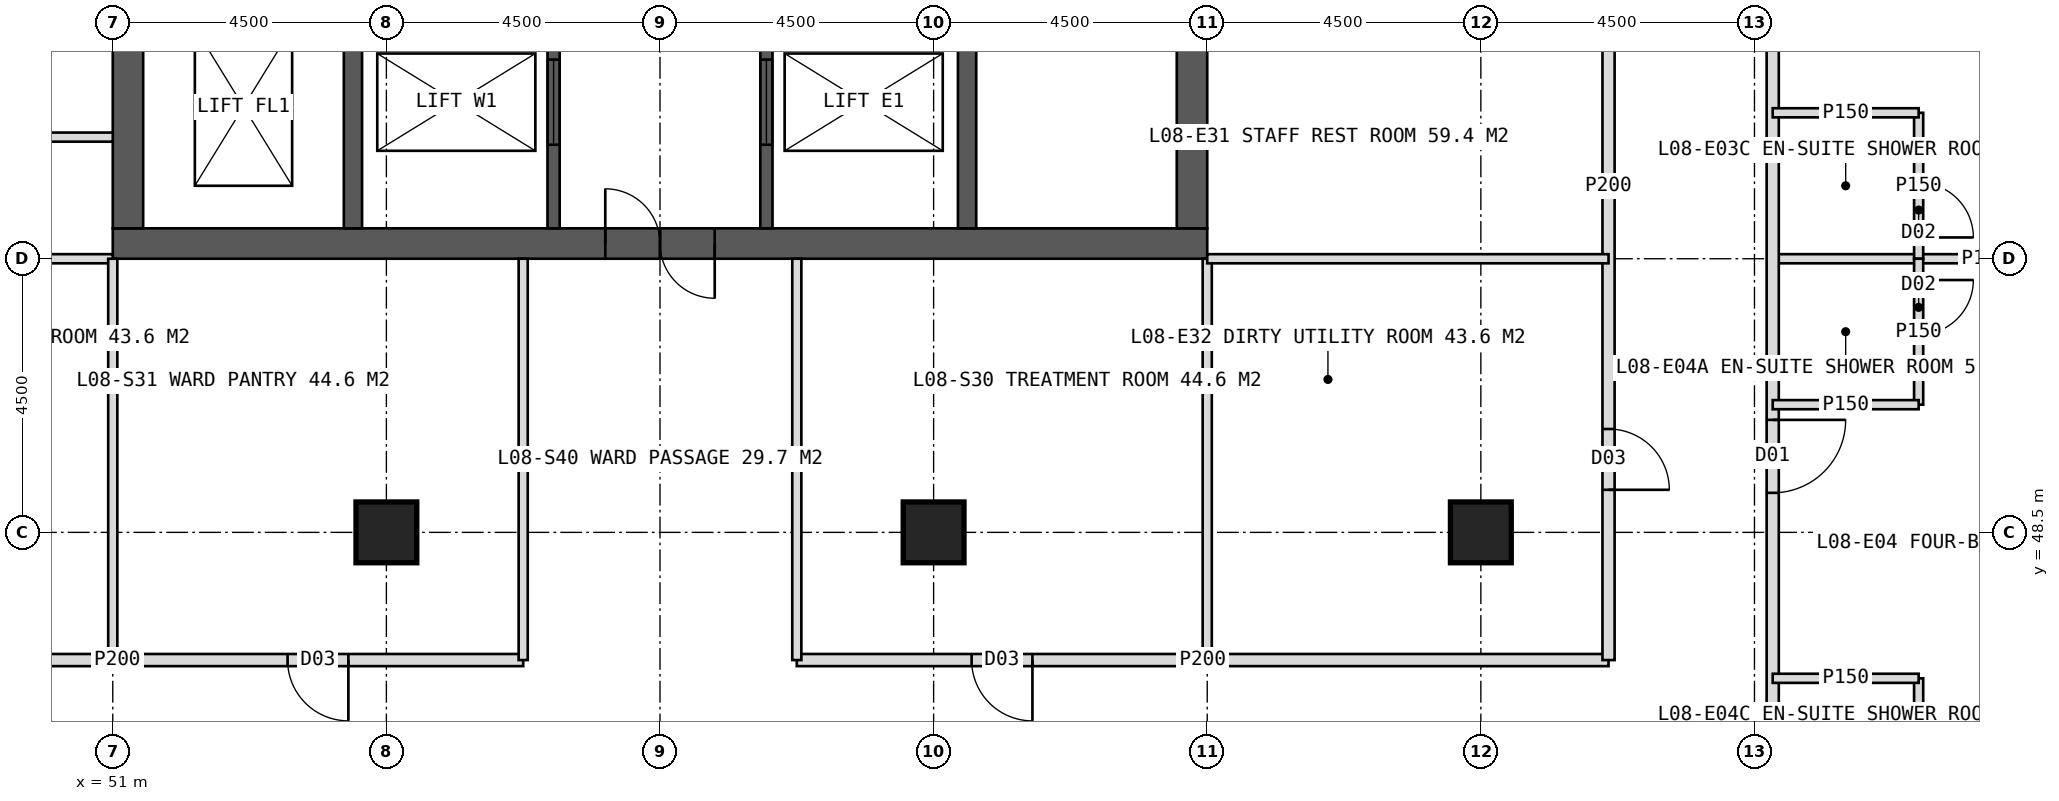
"""IFC4 building model, lengths in metres.
Left out: names, types, materials, properties, quantities, classifications, styles, units other than length and angle.
Written with IfcOpenShell. Run it as: python <this file> out.ifc"""

import sys

from ifc_helpers import new_model, si_unit, direction, frame, frame_2d, origin, origin_2d, place, context, subcontext, project, spatial, rectangle, hollow_rectangle, extrude, element, fill, save


model = new_model("IFC4")
c1 = context("Model", 3, precision=1e-05, world=origin(), true_north=direction((0.0, 1.0)))
c2 = subcontext(c1, "Body", "Model", "MODEL_VIEW")
j1 = project(units=[si_unit("LENGTHUNIT", "METRE"), si_unit("PLANEANGLEUNIT", "RADIAN")], contexts=[c1])
p1 = place(None, origin())
s1 = spatial("IfcSite", under=j1, at=p1, CompositionType="ELEMENT")
p2 = place(p1, origin())
s2 = spatial("IfcBuilding", under=s1, at=p2, CompositionType="ELEMENT")
p3 = place(p2, frame((0.0, 0.0, 39.0)))
s3 = spatial("IfcBuildingStorey", under=s2, at=p3, CompositionType="ELEMENT", Elevation=39.0)
p4 = place(p3, frame((51.0, 53.25, 0.0), z_axis=(0.0, 0.0, 1.0), x_axis=(1.0, 0.0, 0.0)))
e1 = element("IfcWall", 1, at=p4, inside=s3, PredefinedType="SHEAR", context=c2, shape_type="SweptSolid", body=[
    extrude(rectangle(XDim=18.0, YDim=0.5, at=frame_2d((9.0, 0.0))), origin(), (0.0, 0.0, 1.0), 4.0),
])
p5 = place(p4, frame((8.1, 0.0, 0.0)))
e2 = element("IfcOpeningElement", 2, at=p5, cuts=e1, PredefinedType="OPENING", context=c2, shape_type="SweptSolid", body=[
    extrude(rectangle(XDim=1.8, YDim=2.2, at=frame_2d((0.9, 1.1))), frame((0.0, 0.26, 0.0), z_axis=(0.0, -1.0, 0.0), x_axis=(1.0, 0.0, 0.0)), (0.0, 0.0, 1.0), 0.52),
])
p6 = place(p3, frame((51.25, 53.5, 0.0), z_axis=(0.0, 0.0, 1.0), x_axis=(0.0, 1.0, 0.0)))
e3 = element("IfcWall", 3, at=p6, inside=s3, PredefinedType="SHEAR", context=c2, shape_type="SweptSolid", body=[
    extrude(rectangle(XDim=17.0, YDim=0.5, at=frame_2d((8.5, 0.0))), origin(), (0.0, 0.0, 1.0), 4.0),
])
p7 = place(p6, frame((6.0, 0.0, 0.0)))
e4 = element("IfcOpeningElement", 4, at=p7, cuts=e3, PredefinedType="OPENING", context=c2, shape_type="SweptSolid", body=[
    extrude(rectangle(XDim=1.5, YDim=2.2, at=frame_2d((0.75, 1.1))), frame((0.0, 0.26, 0.0), z_axis=(0.0, -1.0, 0.0), x_axis=(1.0, 0.0, 0.0)), (0.0, 0.0, 1.0), 0.52),
])
p8 = place(p3, frame((68.75, 53.5, 0.0), z_axis=(0.0, 0.0, 1.0), x_axis=(0.0, 1.0, 0.0)))
e5 = element("IfcWall", 5, at=p8, inside=s3, PredefinedType="SHEAR", context=c2, shape_type="SweptSolid", body=[
    extrude(rectangle(XDim=17.0, YDim=0.5, at=frame_2d((8.5, 0.0))), origin(), (0.0, 0.0, 1.0), 4.0),
])
p9 = place(p8, frame((9.5, 0.0, 0.0)))
e6 = element("IfcOpeningElement", 6, at=p9, cuts=e5, PredefinedType="OPENING", context=c2, shape_type="SweptSolid", body=[
    extrude(rectangle(XDim=1.5, YDim=2.2, at=frame_2d((0.75, 1.1))), frame((0.0, 0.26, 0.0), z_axis=(0.0, -1.0, 0.0), x_axis=(1.0, 0.0, 0.0)), (0.0, 0.0, 1.0), 0.52),
])
for number, where, z_axis, x_axis in (
    (7, (54.95, 53.5, 0.0), (0.0, 0.0, 1.0), (0.0, 1.0, 0.0)),
    (8, (65.05, 53.5, 0.0), (0.0, 0.0, 1.0), (0.0, 1.0, 0.0)),
):
    element("IfcWall", number, at=place(p3, frame(where, z_axis=z_axis, x_axis=x_axis)), inside=s3, PredefinedType="SHEAR", context=c2, shape_type="SweptSolid", body=[
        extrude(rectangle(XDim=17.0, YDim=0.3, at=frame_2d((8.5, 0.0))), origin(), (0.0, 0.0, 1.0), 4.0),
    ])
p10 = place(p3, frame((58.25, 53.5, 0.0), z_axis=(0.0, 0.0, 1.0), x_axis=(0.0, 1.0, 0.0)))
e9 = element("IfcWall", 9, at=p10, inside=s3, PredefinedType="SHEAR", context=c2, shape_type="SweptSolid", body=[
    extrude(rectangle(XDim=17.0, YDim=0.2, at=frame_2d((8.5, 0.0))), origin(), (0.0, 0.0, 1.0), 4.0),
])
p11 = place(p10, frame((1.375, 0.0, 0.0)))
e10 = element("IfcOpeningElement", 10, at=p11, cuts=e9, PredefinedType="OPENING", context=c2, shape_type="SweptSolid", body=[
    extrude(rectangle(XDim=1.4, YDim=2.2, at=frame_2d((0.7, 1.1))), frame((0.0, 0.11, 0.0), z_axis=(0.0, -1.0, 0.0), x_axis=(1.0, 0.0, 0.0)), (0.0, 0.0, 1.0), 0.22),
])
p12 = place(p10, frame((5.675, 0.0, 0.0)))
e11 = element("IfcOpeningElement", 11, at=p12, cuts=e9, PredefinedType="OPENING", context=c2, shape_type="SweptSolid", body=[
    extrude(rectangle(XDim=1.4, YDim=2.2, at=frame_2d((0.7, 1.1))), frame((0.0, 0.11, 0.0), z_axis=(0.0, -1.0, 0.0), x_axis=(1.0, 0.0, 0.0)), (0.0, 0.0, 1.0), 0.22),
])
p13 = place(p3, frame((61.75, 53.5, 0.0), z_axis=(0.0, 0.0, 1.0), x_axis=(0.0, 1.0, 0.0)))
e12 = element("IfcWall", 12, at=p13, inside=s3, PredefinedType="SHEAR", context=c2, shape_type="SweptSolid", body=[
    extrude(rectangle(XDim=17.0, YDim=0.2, at=frame_2d((8.5, 0.0))), origin(), (0.0, 0.0, 1.0), 4.0),
])
p14 = place(p13, frame((1.375, 0.0, 0.0)))
e13 = element("IfcOpeningElement", 13, at=p14, cuts=e12, PredefinedType="OPENING", context=c2, shape_type="SweptSolid", body=[
    extrude(rectangle(XDim=1.4, YDim=2.2, at=frame_2d((0.7, 1.1))), frame((0.0, 0.11, 0.0), z_axis=(0.0, -1.0, 0.0), x_axis=(1.0, 0.0, 0.0)), (0.0, 0.0, 1.0), 0.22),
])
p15 = place(p13, frame((5.675, 0.0, 0.0)))
e14 = element("IfcOpeningElement", 14, at=p15, cuts=e12, PredefinedType="OPENING", context=c2, shape_type="SweptSolid", body=[
    extrude(rectangle(XDim=1.4, YDim=2.2, at=frame_2d((0.7, 1.1))), frame((0.0, 0.11, 0.0), z_axis=(0.0, -1.0, 0.0), x_axis=(1.0, 0.0, 0.0)), (0.0, 0.0, 1.0), 0.22),
])
for number, where, z_axis, x_axis in (
    (15, (73.5, 48.5, 0.0), (0.0, 0.0, 1.0), (1.0, 0.0, 0.0)),
    (16, (55.5, 48.5, 0.0), (0.0, 0.0, 1.0), (1.0, 0.0, 0.0)),
    (17, (64.5, 48.5, 0.0), (0.0, 0.0, 1.0), (1.0, 0.0, 0.0)),
):
    element("IfcColumn", number, at=place(p3, frame(where, z_axis=z_axis, x_axis=x_axis)), inside=s3, PredefinedType="COLUMN", context=c2, shape_type="SweptSolid", body=[
        extrude(hollow_rectangle(XDim=1.0, YDim=1.0, WallThickness=0.1, at=origin_2d()), origin(), (0.0, 0.0, 1.0), 4.0),
    ])
p16 = place(p3, frame((51.0, 53.0, 0.0), z_axis=(0.0, 0.0, 1.0), x_axis=(-1.0, 0.0, 0.0)))
e18 = element("IfcWall", 18, at=p16, inside=s3, PredefinedType="PARTITIONING", context=c2, shape_type="SweptSolid", body=[
    extrude(rectangle(XDim=6.6, YDim=0.15, at=frame_2d((3.3, 0.0))), origin(), (0.0, 0.0, 1.0), 3.75),
])
p17 = place(p3, frame((51.0, 55.0, 0.0), z_axis=(0.0, 0.0, 1.0), x_axis=(-1.0, 0.0, 0.0)))
e19 = element("IfcWall", 19, at=p17, inside=s3, PredefinedType="PARTITIONING", context=c2, shape_type="SweptSolid", body=[
    extrude(rectangle(XDim=2.4, YDim=0.15, at=frame_2d((1.2, 0.0))), origin(), (0.0, 0.0, 1.0), 3.75),
])
p18 = place(p3, frame((69.0, 53.0, 0.0), z_axis=(0.0, 0.0, 1.0), x_axis=(0.0, -1.0, 0.0)))
e20 = element("IfcWall", 20, at=p18, inside=s3, PredefinedType="PARTITIONING", context=c2, shape_type="SweptSolid", body=[
    extrude(rectangle(XDim=6.6, YDim=0.15, at=frame_2d((3.3, 0.0))), origin(), (0.0, 0.0, 1.0), 3.75),
])
p19 = place(p3, frame((75.6, 46.4, 0.0), z_axis=(0.0, 0.0, 1.0), x_axis=(-1.0, 0.0, 0.0)))
e21 = element("IfcWall", 21, at=p19, inside=s3, PredefinedType="PARTITIONING", context=c2, shape_type="SweptSolid", body=[
    extrude(rectangle(XDim=13.35, YDim=0.2, at=frame_2d((6.675, 0.0))), origin(), (0.0, 0.0, 1.0), 3.75),
])
p20 = place(p19, frame((9.475, 0.0, 0.0)))
e22 = element("IfcOpeningElement", 22, at=p20, cuts=e21, PredefinedType="OPENING", context=c2, shape_type="SweptSolid", body=[
    extrude(rectangle(XDim=1.0, YDim=2.1, at=frame_2d((0.5, 1.05))), frame((0.0, 0.11, 0.0), z_axis=(0.0, -1.0, 0.0), x_axis=(1.0, 0.0, 0.0)), (0.0, 0.0, 1.0), 0.22),
])
p21 = place(p3, frame((57.75, 46.4, 0.0), z_axis=(0.0, 0.0, 1.0), x_axis=(-1.0, 0.0, 0.0)))
e23 = element("IfcWall", 23, at=p21, inside=s3, PredefinedType="PARTITIONING", context=c2, shape_type="SweptSolid", body=[
    extrude(rectangle(XDim=13.35, YDim=0.2, at=frame_2d((6.675, 0.0))), origin(), (0.0, 0.0, 1.0), 3.75),
])
p22 = place(p21, frame((2.875, 0.0, 0.0)))
e24 = element("IfcOpeningElement", 24, at=p22, cuts=e23, PredefinedType="OPENING", context=c2, shape_type="SweptSolid", body=[
    extrude(rectangle(XDim=1.0, YDim=2.1, at=frame_2d((0.5, 1.05))), frame((0.0, 0.11, 0.0), z_axis=(0.0, -1.0, 0.0), x_axis=(1.0, 0.0, 0.0)), (0.0, 0.0, 1.0), 0.22),
])
p23 = place(p21, frame((9.55, 0.0, 0.0)))
e25 = element("IfcOpeningElement", 25, at=p23, cuts=e23, PredefinedType="OPENING", context=c2, shape_type="SweptSolid", body=[
    extrude(rectangle(XDim=1.0, YDim=2.1, at=frame_2d((0.5, 1.05))), frame((0.0, 0.11, 0.0), z_axis=(0.0, -1.0, 0.0), x_axis=(1.0, 0.0, 0.0)), (0.0, 0.0, 1.0), 0.22),
])
for number, where, z_axis, x_axis in (
    (26, (62.25, 53.0, 0.0), (0.0, 0.0, 1.0), (0.0, -1.0, 0.0)),
    (27, (57.75, 53.0, 0.0), (0.0, 0.0, 1.0), (0.0, -1.0, 0.0)),
    (28, (51.0, 53.0, 0.0), (0.0, 0.0, 1.0), (0.0, -1.0, 0.0)),
):
    element("IfcWall", number, at=place(p3, frame(where, z_axis=z_axis, x_axis=x_axis)), inside=s3, PredefinedType="PARTITIONING", context=c2, shape_type="SweptSolid", body=[
        extrude(rectangle(XDim=6.6, YDim=0.15, at=frame_2d((3.3, 0.0))), origin(), (0.0, 0.0, 1.0), 3.75),
    ])
p24 = place(p3, frame((78.3, 53.0, 0.0), z_axis=(0.0, 0.0, 1.0), x_axis=(1.0, 0.0, 0.0)))
e29 = element("IfcWall", 29, at=p24, inside=s3, PredefinedType="PARTITIONING", context=c2, shape_type="SweptSolid", body=[
    extrude(rectangle(XDim=6.975, YDim=0.15, at=frame_2d((3.487, 0.0))), origin(), (0.0, 0.0, 1.0), 3.75),
])
p25 = place(p3, frame((78.3, 80.3, 0.0), z_axis=(0.0, 0.0, 1.0), x_axis=(0.0, -1.0, 0.0)))
e30 = element("IfcWall", 30, at=p25, inside=s3, PredefinedType="PARTITIONING", context=c2, shape_type="SweptSolid", body=[
    extrude(rectangle(XDim=36.6, YDim=0.2, at=frame_2d((18.3, 0.0))), origin(), (0.0, 0.0, 1.0), 3.75),
])
p26 = place(p25, frame((2.65, 0.0, 0.0)))
e31 = element("IfcOpeningElement", 31, at=p26, cuts=e30, PredefinedType="OPENING", context=c2, shape_type="SweptSolid", body=[
    extrude(rectangle(XDim=1.2, YDim=2.2, at=frame_2d((0.6, 1.1))), frame((0.0, 0.11, 0.0), z_axis=(0.0, -1.0, 0.0), x_axis=(1.0, 0.0, 0.0)), (0.0, 0.0, 1.0), 0.22),
])
p27 = place(p25, frame((11.95, 0.0, 0.0)))
e32 = element("IfcOpeningElement", 32, at=p27, cuts=e30, PredefinedType="OPENING", context=c2, shape_type="SweptSolid", body=[
    extrude(rectangle(XDim=1.2, YDim=2.2, at=frame_2d((0.6, 1.1))), frame((0.0, 0.11, 0.0), z_axis=(0.0, -1.0, 0.0), x_axis=(1.0, 0.0, 0.0)), (0.0, 0.0, 1.0), 0.22),
])
p28 = place(p25, frame((20.95, 0.0, 0.0)))
e33 = element("IfcOpeningElement", 33, at=p28, cuts=e30, PredefinedType="OPENING", context=c2, shape_type="SweptSolid", body=[
    extrude(rectangle(XDim=1.2, YDim=2.2, at=frame_2d((0.6, 1.1))), frame((0.0, 0.11, 0.0), z_axis=(0.0, -1.0, 0.0), x_axis=(1.0, 0.0, 0.0)), (0.0, 0.0, 1.0), 0.22),
])
p29 = place(p25, frame((29.95, 0.0, 0.0)))
e34 = element("IfcOpeningElement", 34, at=p29, cuts=e30, PredefinedType="OPENING", context=c2, shape_type="SweptSolid", body=[
    extrude(rectangle(XDim=1.2, YDim=2.2, at=frame_2d((0.6, 1.1))), frame((0.0, 0.11, 0.0), z_axis=(0.0, -1.0, 0.0), x_axis=(1.0, 0.0, 0.0)), (0.0, 0.0, 1.0), 0.22),
])
p30 = place(p3, frame((80.7, 55.4, 0.0), z_axis=(0.0, 0.0, 1.0), x_axis=(0.0, -1.0, 0.0)))
e35 = element("IfcWall", 35, at=p30, inside=s3, PredefinedType="PARTITIONING", context=c2, shape_type="SweptSolid", body=[
    extrude(rectangle(XDim=2.4, YDim=0.15, at=frame_2d((1.2, 0.0))), origin(), (0.0, 0.0, 1.0), 3.75),
])
p31 = place(p30, frame((1.15, 0.0, 0.0)))
e36 = element("IfcOpeningElement", 36, at=p31, cuts=e35, PredefinedType="OPENING", context=c2, shape_type="SweptSolid", body=[
    extrude(rectangle(XDim=0.9, YDim=2.1, at=frame_2d((0.45, 1.05))), frame((0.0, 0.085, 0.0), z_axis=(0.0, -1.0, 0.0), x_axis=(1.0, 0.0, 0.0)), (0.0, 0.0, 1.0), 0.17),
])
p32 = place(p3, frame((78.3, 55.4, 0.0), z_axis=(0.0, 0.0, 1.0), x_axis=(1.0, 0.0, 0.0)))
e37 = element("IfcWall", 37, at=p32, inside=s3, PredefinedType="PARTITIONING", context=c2, shape_type="SweptSolid", body=[
    extrude(rectangle(XDim=2.4, YDim=0.15, at=frame_2d((1.2, 0.0))), origin(), (0.0, 0.0, 1.0), 3.75),
])
p33 = place(p3, frame((80.7, 53.0, 0.0), z_axis=(0.0, 0.0, 1.0), x_axis=(0.0, -1.0, 0.0)))
e38 = element("IfcWall", 38, at=p33, inside=s3, PredefinedType="PARTITIONING", context=c2, shape_type="SweptSolid", body=[
    extrude(rectangle(XDim=2.4, YDim=0.15, at=frame_2d((1.2, 0.0))), origin(), (0.0, 0.0, 1.0), 3.75),
])
p34 = place(p33, frame((0.35, 0.0, 0.0)))
e39 = element("IfcOpeningElement", 39, at=p34, cuts=e38, PredefinedType="OPENING", context=c2, shape_type="SweptSolid", body=[
    extrude(rectangle(XDim=0.9, YDim=2.1, at=frame_2d((0.45, 1.05))), frame((0.0, 0.085, 0.0), z_axis=(0.0, -1.0, 0.0), x_axis=(1.0, 0.0, 0.0)), (0.0, 0.0, 1.0), 0.17),
])
p35 = place(p3, frame((78.3, 50.6, 0.0), z_axis=(0.0, 0.0, 1.0), x_axis=(1.0, 0.0, 0.0)))
e40 = element("IfcWall", 40, at=p35, inside=s3, PredefinedType="PARTITIONING", context=c2, shape_type="SweptSolid", body=[
    extrude(rectangle(XDim=2.4, YDim=0.15, at=frame_2d((1.2, 0.0))), origin(), (0.0, 0.0, 1.0), 3.75),
])
p36 = place(p3, frame((80.7, 46.1, 0.0), z_axis=(0.0, 0.0, 1.0), x_axis=(0.0, -1.0, 0.0)))
e41 = element("IfcWall", 41, at=p36, inside=s3, PredefinedType="PARTITIONING", context=c2, shape_type="SweptSolid", body=[
    extrude(rectangle(XDim=2.4, YDim=0.15, at=frame_2d((1.2, 0.0))), origin(), (0.0, 0.0, 1.0), 2.95),
])
p37 = place(p36, frame((1.15, 0.0, 0.0)))
e42 = element("IfcOpeningElement", 42, at=p37, cuts=e41, PredefinedType="OPENING", context=c2, shape_type="SweptSolid", body=[
    extrude(rectangle(XDim=0.9, YDim=2.1, at=frame_2d((0.45, 1.05))), frame((0.0, 0.085, 0.0), z_axis=(0.0, -1.0, 0.0), x_axis=(1.0, 0.0, 0.0)), (0.0, 0.0, 1.0), 0.17),
])
p38 = place(p3, frame((78.3, 46.1, 0.0), z_axis=(0.0, 0.0, 1.0), x_axis=(1.0, 0.0, 0.0)))
e43 = element("IfcWall", 43, at=p38, inside=s3, PredefinedType="PARTITIONING", context=c2, shape_type="SweptSolid", body=[
    extrude(rectangle(XDim=2.4, YDim=0.15, at=frame_2d((1.2, 0.0))), origin(), (0.0, 0.0, 1.0), 3.75),
])
p39 = place(p3, frame((75.6, 62.0, 0.0), z_axis=(0.0, 0.0, 1.0), x_axis=(0.0, -1.0, 0.0)))
e44 = element("IfcWall", 44, at=p39, inside=s3, PredefinedType="PARTITIONING", context=c2, shape_type="SweptSolid", body=[
    extrude(rectangle(XDim=15.6, YDim=0.2, at=frame_2d((7.8, 0.0))), origin(), (0.0, 0.0, 1.0), 3.75),
])
p40 = place(p39, frame((4.0, 0.0, 0.0)))
e45 = element("IfcOpeningElement", 45, at=p40, cuts=e44, PredefinedType="OPENING", context=c2, shape_type="SweptSolid", body=[
    extrude(rectangle(XDim=1.0, YDim=2.1, at=frame_2d((0.5, 1.05))), frame((0.0, 0.11, 0.0), z_axis=(0.0, -1.0, 0.0), x_axis=(1.0, 0.0, 0.0)), (0.0, 0.0, 1.0), 0.22),
])
p41 = place(p39, frame((11.8, 0.0, 0.0)))
e46 = element("IfcOpeningElement", 46, at=p41, cuts=e44, PredefinedType="OPENING", context=c2, shape_type="SweptSolid", body=[
    extrude(rectangle(XDim=1.0, YDim=2.1, at=frame_2d((0.5, 1.05))), frame((0.0, 0.11, 0.0), z_axis=(0.0, -1.0, 0.0), x_axis=(1.0, 0.0, 0.0)), (0.0, 0.0, 1.0), 0.22),
])
p42 = place(p3, frame((69.0, 53.0, 0.0), z_axis=(0.0, 0.0, 1.0), x_axis=(1.0, 0.0, 0.0)))
e47 = element("IfcWall", 47, at=p42, inside=s3, PredefinedType="PARTITIONING", context=c2, shape_type="SweptSolid", body=[
    extrude(rectangle(XDim=6.6, YDim=0.15, at=frame_2d((3.3, 0.0))), origin(), (0.0, 0.0, 1.0), 3.75),
])
p43 = place(p20, origin())
e48 = element("IfcDoor", 48, at=p43, inside=s3, OperationType="SINGLE_SWING_LEFT", PredefinedType="DOOR", context=c2, shape_type="SweptSolid", body=[
    extrude(rectangle(XDim=1.0, YDim=2.1, at=frame_2d((0.5, 1.05))), frame((0.0, 0.025, 0.0), z_axis=(0.0, -1.0, 0.0), x_axis=(1.0, 0.0, 0.0)), (0.0, 0.0, 1.0), 0.05),
])
fill(e22, e48)
p44 = place(p22, origin())
e49 = element("IfcDoor", 49, at=p44, inside=s3, OperationType="SINGLE_SWING_LEFT", PredefinedType="DOOR", context=c2, shape_type="SweptSolid", body=[
    extrude(rectangle(XDim=1.0, YDim=2.1, at=frame_2d((0.5, 1.05))), frame((0.0, 0.025, 0.0), z_axis=(0.0, -1.0, 0.0), x_axis=(1.0, 0.0, 0.0)), (0.0, 0.0, 1.0), 0.05),
])
fill(e24, e49)
p45 = place(p31, origin())
e50 = element("IfcDoor", 50, at=p45, inside=s3, OperationType="SINGLE_SWING_RIGHT", PredefinedType="DOOR", context=c2, shape_type="SweptSolid", body=[
    extrude(rectangle(XDim=0.9, YDim=2.1, at=frame_2d((0.45, 1.05))), frame((0.0, 0.025, 0.0), z_axis=(0.0, -1.0, 0.0), x_axis=(1.0, 0.0, 0.0)), (0.0, 0.0, 1.0), 0.05),
])
fill(e36, e50)
p46 = place(p29, origin())
e51 = element("IfcDoor", 51, at=p46, inside=s3, OperationType="SINGLE_SWING_LEFT", PredefinedType="DOOR", context=c2, shape_type="SweptSolid", body=[
    extrude(rectangle(XDim=1.2, YDim=2.2, at=frame_2d((0.6, 1.1))), frame((0.0, 0.025, 0.0), z_axis=(0.0, -1.0, 0.0), x_axis=(1.0, 0.0, 0.0)), (0.0, 0.0, 1.0), 0.05),
])
fill(e34, e51)
p47 = place(p34, origin())
e52 = element("IfcDoor", 52, at=p47, inside=s3, OperationType="SINGLE_SWING_LEFT", PredefinedType="DOOR", context=c2, shape_type="SweptSolid", body=[
    extrude(rectangle(XDim=0.9, YDim=2.1, at=frame_2d((0.45, 1.05))), frame((0.0, 0.025, 0.0), z_axis=(0.0, -1.0, 0.0), x_axis=(1.0, 0.0, 0.0)), (0.0, 0.0, 1.0), 0.05),
])
fill(e39, e52)
p48 = place(p41, origin())
e53 = element("IfcDoor", 53, at=p48, inside=s3, OperationType="SINGLE_SWING_RIGHT", PredefinedType="DOOR", context=c2, shape_type="SweptSolid", body=[
    extrude(rectangle(XDim=1.0, YDim=2.1, at=frame_2d((0.5, 1.05))), frame((0.0, 0.025, 0.0), z_axis=(0.0, -1.0, 0.0), x_axis=(1.0, 0.0, 0.0)), (0.0, 0.0, 1.0), 0.05),
])
fill(e46, e53)
p49 = place(p5, origin())
e54 = element("IfcDoor", 54, at=p49, inside=s3, OperationType="DOUBLE_DOOR_SINGLE_SWING", PredefinedType="DOOR", context=c2, shape_type="SweptSolid", body=[
    extrude(rectangle(XDim=1.8, YDim=2.2, at=frame_2d((0.9, 1.1))), frame((0.0, 0.025, 0.0), z_axis=(0.0, -1.0, 0.0), x_axis=(1.0, 0.0, 0.0)), (0.0, 0.0, 1.0), 0.05),
])
fill(e2, e54)
p50 = place(p11, origin())
e55 = element("IfcDoor", 55, at=p50, inside=s3, OperationType="SLIDING_TO_LEFT", PredefinedType="DOOR", context=c2, shape_type="SweptSolid", body=[
    extrude(rectangle(XDim=1.4, YDim=2.2, at=frame_2d((0.7, 1.1))), frame((0.0, 0.025, 0.0), z_axis=(0.0, -1.0, 0.0), x_axis=(1.0, 0.0, 0.0)), (0.0, 0.0, 1.0), 0.05),
])
fill(e10, e55)
p51 = place(p14, origin())
e56 = element("IfcDoor", 56, at=p51, inside=s3, OperationType="SLIDING_TO_LEFT", PredefinedType="DOOR", context=c2, shape_type="SweptSolid", body=[
    extrude(rectangle(XDim=1.4, YDim=2.2, at=frame_2d((0.7, 1.1))), frame((0.0, 0.025, 0.0), z_axis=(0.0, -1.0, 0.0), x_axis=(1.0, 0.0, 0.0)), (0.0, 0.0, 1.0), 0.05),
])
fill(e13, e56)
save(model, sys.argv[1])
